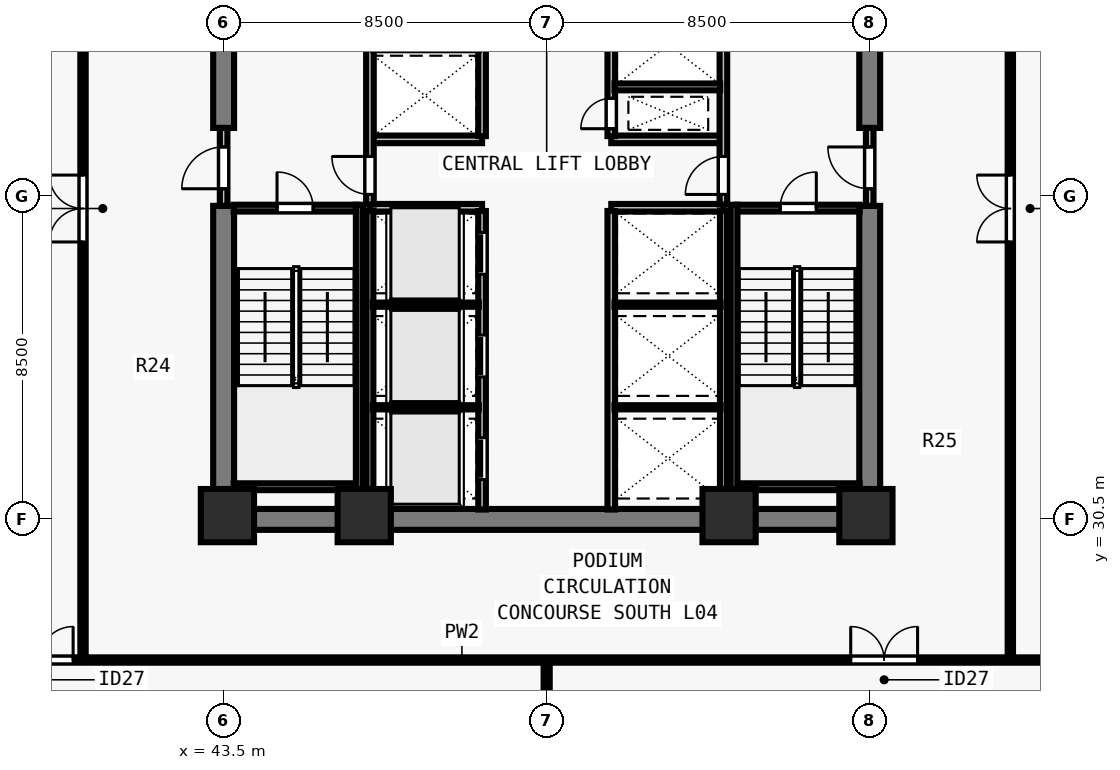
"""IFC4 building model, lengths in metres.
Left out: names, types, materials, properties, quantities, classifications, styles, units other than length and angle.
Written with IfcOpenShell. Run it as: python <this file> out.ifc"""

import sys

from ifc_helpers import new_model, si_unit, direction, frame, frame_2d, origin, origin_2d, place, context, subcontext, project, spatial, rectangle, extrude, element, fill, save


model = new_model("IFC4")
c1 = context("Model", 3, precision=1e-05, world=origin(), true_north=direction((0.0, 1.0)))
c2 = subcontext(c1, "Body", "Model", "MODEL_VIEW")
j1 = project(units=[si_unit("LENGTHUNIT", "METRE"), si_unit("PLANEANGLEUNIT", "RADIAN")], contexts=[c1])
p1 = place(None, origin())
s1 = spatial("IfcSite", under=j1, at=p1, CompositionType="ELEMENT")
p2 = place(p1, origin())
s2 = spatial("IfcBuilding", under=s1, at=p2, CompositionType="ELEMENT")
p3 = place(p2, frame((0.0, 0.0, 19.0)))
s3 = spatial("IfcBuildingStorey", under=s2, at=p3, CompositionType="ELEMENT", Elevation=19.0)
for number, where, z_axis, x_axis in (
    (1, (43.6, 30.6, 0.0), (0.0, 0.0, 1.0), (1.0, 0.0, 0.0)),
    (2, (47.2, 30.6, 0.0), (0.0, 0.0, 1.0), (1.0, 0.0, 0.0)),
    (3, (56.8, 30.6, 0.0), (0.0, 0.0, 1.0), (1.0, 0.0, 0.0)),
    (4, (60.4, 30.6, 0.0), (0.0, 0.0, 1.0), (1.0, 0.0, 0.0)),
):
    element("IfcColumn", number, at=place(p3, frame(where, z_axis=z_axis, x_axis=x_axis)), inside=s3, PredefinedType="COLUMN", context=c2, shape_type="SweptSolid", body=[
        extrude(rectangle(XDim=1.4, YDim=1.4, at=origin_2d()), origin(), (0.0, 0.0, 1.0), 4.5),
    ])
p4 = place(p3, frame((43.225, 30.5, 0.0), z_axis=(0.0, 0.0, 1.0), x_axis=(1.0, 0.0, 0.0)))
e5 = element("IfcWall", 5, at=p4, inside=s3, PredefinedType="SHEAR", context=c2, shape_type="SweptSolid", body=[
    extrude(rectangle(XDim=17.55, YDim=0.55, at=frame_2d((8.775, 0.0))), origin(), (0.0, 0.0, 1.0), 4.28),
])
p5 = place(p3, frame((43.5, 30.765, 0.0), z_axis=(0.0, 0.0, 1.0), x_axis=(0.0, 1.0, 0.0)))
e6 = element("IfcWall", 6, at=p5, inside=s3, PredefinedType="SHEAR", context=c2, shape_type="SweptSolid", body=[
    extrude(rectangle(XDim=7.985, YDim=0.55, at=frame_2d((3.993, 0.0))), origin(), (0.0, 0.0, 1.0), 4.28),
])
p6 = place(p3, frame((43.5, 40.8, 0.0), z_axis=(0.0, 0.0, 1.0), x_axis=(0.0, 1.0, 0.0)))
e7 = element("IfcWall", 7, at=p6, inside=s3, PredefinedType="SHEAR", context=c2, shape_type="SweptSolid", body=[
    extrude(rectangle(XDim=6.435, YDim=0.55, at=frame_2d((3.218, 0.0))), origin(), (0.0, 0.0, 1.0), 4.28),
])
p7 = place(p3, frame((60.5, 30.765, 0.0), z_axis=(0.0, 0.0, 1.0), x_axis=(0.0, 1.0, 0.0)))
e8 = element("IfcWall", 8, at=p7, inside=s3, PredefinedType="SHEAR", context=c2, shape_type="SweptSolid", body=[
    extrude(rectangle(XDim=7.985, YDim=0.55, at=frame_2d((3.993, 0.0))), origin(), (0.0, 0.0, 1.0), 4.28),
])
p8 = place(p3, frame((60.5, 40.8, 0.0), z_axis=(0.0, 0.0, 1.0), x_axis=(0.0, 1.0, 0.0)))
e9 = element("IfcWall", 9, at=p8, inside=s3, PredefinedType="SHEAR", context=c2, shape_type="SweptSolid", body=[
    extrude(rectangle(XDim=6.435, YDim=0.55, at=frame_2d((3.218, 0.0))), origin(), (0.0, 0.0, 1.0), 4.28),
])
for number, where, z_axis, x_axis in (
    (10, (47.35, 38.7, 0.0), (0.0, 0.0, 1.0), (1.0, 0.0, 0.0)),
    (11, (47.35, 40.5, 0.0), (0.0, 0.0, 1.0), (1.0, 0.0, 0.0)),
    (12, (53.7, 38.7, 0.0), (0.0, 0.0, 1.0), (1.0, 0.0, 0.0)),
    (13, (53.7, 40.5, 0.0), (0.0, 0.0, 1.0), (1.0, 0.0, 0.0)),
):
    element("IfcWall", number, at=place(p3, frame(where, z_axis=z_axis, x_axis=x_axis)), inside=s3, PredefinedType="SOLIDWALL", context=c2, shape_type="SweptSolid", body=[
        extrude(rectangle(XDim=2.95, YDim=0.2, at=frame_2d((1.475, 0.0))), origin(), (0.0, 0.0, 1.0), 4.28),
    ])
p9 = place(p3, frame((50.3, 30.76, 0.0), z_axis=(0.0, 0.0, 1.0), x_axis=(0.0, 1.0, 0.0)))
e14 = element("IfcWall", 14, at=p9, inside=s3, PredefinedType="SOLIDWALL", context=c2, shape_type="SweptSolid", body=[
    extrude(rectangle(XDim=7.855, YDim=0.2, at=frame_2d((3.927, 0.0))), origin(), (0.0, 0.0, 1.0), 4.28),
])
p10 = place(p9, frame((0.79, 0.0, 0.0)))
e15 = element("IfcOpeningElement", 15, at=p10, cuts=e14, PredefinedType="OPENING", context=c2, shape_type="SweptSolid", body=[
    extrude(rectangle(XDim=1.1, YDim=2.2, at=frame_2d((0.55, 1.1))), frame((0.0, 0.11, 0.0), z_axis=(0.0, -1.0, 0.0), x_axis=(1.0, 0.0, 0.0)), (0.0, 0.0, 1.0), 0.22),
])
p11 = place(p9, frame((3.49, 0.0, 0.0)))
e16 = element("IfcOpeningElement", 16, at=p11, cuts=e14, PredefinedType="OPENING", context=c2, shape_type="SweptSolid", body=[
    extrude(rectangle(XDim=1.1, YDim=2.2, at=frame_2d((0.55, 1.1))), frame((0.0, 0.11, 0.0), z_axis=(0.0, -1.0, 0.0), x_axis=(1.0, 0.0, 0.0)), (0.0, 0.0, 1.0), 0.22),
])
p12 = place(p9, frame((6.19, 0.0, 0.0)))
e17 = element("IfcOpeningElement", 17, at=p12, cuts=e14, PredefinedType="OPENING", context=c2, shape_type="SweptSolid", body=[
    extrude(rectangle(XDim=1.1, YDim=2.2, at=frame_2d((0.55, 1.1))), frame((0.0, 0.11, 0.0), z_axis=(0.0, -1.0, 0.0), x_axis=(1.0, 0.0, 0.0)), (0.0, 0.0, 1.0), 0.22),
])
p13 = place(p3, frame((53.7, 30.76, 0.0), z_axis=(0.0, 0.0, 1.0), x_axis=(0.0, 1.0, 0.0)))
e18 = element("IfcWall", 18, at=p13, inside=s3, PredefinedType="SOLIDWALL", context=c2, shape_type="SweptSolid", body=[
    extrude(rectangle(XDim=7.855, YDim=0.2, at=frame_2d((3.927, 0.0))), origin(), (0.0, 0.0, 1.0), 4.28),
])
p14 = place(p3, frame((50.3, 40.585, 0.0), z_axis=(0.0, 0.0, 1.0), x_axis=(0.0, 1.0, 0.0)))
e19 = element("IfcWall", 19, at=p14, inside=s3, PredefinedType="SOLIDWALL", context=c2, shape_type="SweptSolid", body=[
    extrude(rectangle(XDim=6.655, YDim=0.2, at=frame_2d((3.328, 0.0))), origin(), (0.0, 0.0, 1.0), 4.28),
])
p15 = place(p14, frame((5.065, 0.0, 0.0)))
e20 = element("IfcOpeningElement", 20, at=p15, cuts=e19, PredefinedType="OPENING", context=c2, shape_type="SweptSolid", body=[
    extrude(rectangle(XDim=0.8, YDim=2.08, at=frame_2d((0.4, 1.04))), frame((0.0, 0.11, 0.0), z_axis=(0.0, -1.0, 0.0), x_axis=(1.0, 0.0, 0.0)), (0.0, 0.0, 1.0), 0.22),
])
p16 = place(p3, frame((53.7, 40.585, 0.0), z_axis=(0.0, 0.0, 1.0), x_axis=(0.0, 1.0, 0.0)))
e21 = element("IfcWall", 21, at=p16, inside=s3, PredefinedType="SOLIDWALL", context=c2, shape_type="SweptSolid", body=[
    extrude(rectangle(XDim=6.655, YDim=0.2, at=frame_2d((3.328, 0.0))), origin(), (0.0, 0.0, 1.0), 4.28),
])
p17 = place(p16, frame((0.195, 0.0, 0.0)))
e22 = element("IfcOpeningElement", 22, at=p17, cuts=e21, PredefinedType="OPENING", context=c2, shape_type="SweptSolid", body=[
    extrude(rectangle(XDim=0.8, YDim=2.08, at=frame_2d((0.4, 1.04))), frame((0.0, 0.11, 0.0), z_axis=(0.0, -1.0, 0.0), x_axis=(1.0, 0.0, 0.0)), (0.0, 0.0, 1.0), 0.22),
])
p18 = place(p16, frame((4.265, 0.0, 0.0)))
e23 = element("IfcOpeningElement", 23, at=p18, cuts=e21, PredefinedType="OPENING", context=c2, shape_type="SweptSolid", body=[
    extrude(rectangle(XDim=0.95, YDim=2.12, at=frame_2d((0.475, 1.06))), frame((0.0, 0.11, 0.0), z_axis=(0.0, -1.0, 0.0), x_axis=(1.0, 0.0, 0.0)), (0.0, 0.0, 1.0), 0.22),
])
p19 = place(p3, frame((43.5, 38.75, 0.0), z_axis=(0.0, 0.0, 1.0), x_axis=(0.0, 1.0, 0.0)))
e24 = element("IfcWall", 24, at=p19, inside=s3, PredefinedType="SOLIDWALL", context=c2, shape_type="SweptSolid", body=[
    extrude(rectangle(XDim=2.05, YDim=0.2, at=frame_2d((1.025, 0.0))), origin(), (0.0, 0.0, 1.0), 4.28),
])
p20 = place(p19, frame((0.45, 0.0, 0.0)))
e25 = element("IfcOpeningElement", 25, at=p20, cuts=e24, PredefinedType="OPENING", context=c2, shape_type="SweptSolid", body=[
    extrude(rectangle(XDim=1.1, YDim=2.15, at=frame_2d((0.55, 1.075))), frame((0.0, 0.11, 0.0), z_axis=(0.0, -1.0, 0.0), x_axis=(1.0, 0.0, 0.0)), (0.0, 0.0, 1.0), 0.22),
])
p21 = place(p3, frame((47.35, 38.785, 0.0), z_axis=(0.0, 0.0, 1.0), x_axis=(0.0, 1.0, 0.0)))
e26 = element("IfcWall", 26, at=p21, inside=s3, PredefinedType="SOLIDWALL", context=c2, shape_type="SweptSolid", body=[
    extrude(rectangle(XDim=4.865, YDim=0.2, at=frame_2d((2.433, 0.0))), origin(), (0.0, 0.0, 1.0), 4.28),
])
p22 = place(p21, frame((0.265, 0.0, 0.0)))
e27 = element("IfcOpeningElement", 27, at=p22, cuts=e26, PredefinedType="OPENING", context=c2, shape_type="SweptSolid", body=[
    extrude(rectangle(XDim=1.0, YDim=2.15, at=frame_2d((0.5, 1.075))), frame((0.0, 0.11, 0.0), z_axis=(0.0, -1.0, 0.0), x_axis=(1.0, 0.0, 0.0)), (0.0, 0.0, 1.0), 0.22),
])
p23 = place(p3, frame((60.5, 38.75, 0.0), z_axis=(0.0, 0.0, 1.0), x_axis=(0.0, 1.0, 0.0)))
e28 = element("IfcWall", 28, at=p23, inside=s3, PredefinedType="SOLIDWALL", context=c2, shape_type="SweptSolid", body=[
    extrude(rectangle(XDim=2.05, YDim=0.2, at=frame_2d((1.025, 0.0))), origin(), (0.0, 0.0, 1.0), 4.28),
])
p24 = place(p23, frame((0.45, 0.0, 0.0)))
e29 = element("IfcOpeningElement", 29, at=p24, cuts=e28, PredefinedType="OPENING", context=c2, shape_type="SweptSolid", body=[
    extrude(rectangle(XDim=1.1, YDim=2.15, at=frame_2d((0.55, 1.075))), frame((0.0, 0.11, 0.0), z_axis=(0.0, -1.0, 0.0), x_axis=(1.0, 0.0, 0.0)), (0.0, 0.0, 1.0), 0.22),
])
p25 = place(p3, frame((56.65, 38.785, 0.0), z_axis=(0.0, 0.0, 1.0), x_axis=(0.0, 1.0, 0.0)))
e30 = element("IfcWall", 30, at=p25, inside=s3, PredefinedType="SOLIDWALL", context=c2, shape_type="SweptSolid", body=[
    extrude(rectangle(XDim=4.865, YDim=0.2, at=frame_2d((2.433, 0.0))), origin(), (0.0, 0.0, 1.0), 4.28),
])
p26 = place(p25, frame((0.265, 0.0, 0.0)))
e31 = element("IfcOpeningElement", 31, at=p26, cuts=e30, PredefinedType="OPENING", context=c2, shape_type="SweptSolid", body=[
    extrude(rectangle(XDim=1.0, YDim=2.15, at=frame_2d((0.5, 1.075))), frame((0.0, 0.11, 0.0), z_axis=(0.0, -1.0, 0.0), x_axis=(1.0, 0.0, 0.0)), (0.0, 0.0, 1.0), 0.22),
])
p27 = place(p3, frame((47.35, 30.76, 0.0), z_axis=(0.0, 0.0, 1.0), x_axis=(0.0, 1.0, 0.0)))
e32 = element("IfcWall", 32, at=p27, inside=s3, PredefinedType="SOLIDWALL", context=c2, shape_type="SweptSolid", body=[
    extrude(rectangle(XDim=7.855, YDim=0.18, at=frame_2d((3.927, 0.0))), origin(), (0.0, 0.0, 1.0), 4.28),
])
for number, where, z_axis, x_axis in (
    (33, (47.425, 33.45, 0.0), (0.0, 0.0, 1.0), (1.0, 0.0, 0.0)),
    (34, (47.425, 36.15, 0.0), (0.0, 0.0, 1.0), (1.0, 0.0, 0.0)),
):
    element("IfcWall", number, at=place(p3, frame(where, z_axis=z_axis, x_axis=x_axis)), inside=s3, PredefinedType="PARTITIONING", context=c2, shape_type="SweptSolid", body=[
        extrude(rectangle(XDim=2.79, YDim=0.11, at=frame_2d((1.395, 0.0))), origin(), (0.0, 0.0, 1.0), 4.28),
    ])
p28 = place(p3, frame((56.65, 30.76, 0.0), z_axis=(0.0, 0.0, 1.0), x_axis=(0.0, 1.0, 0.0)))
e35 = element("IfcWall", 35, at=p28, inside=s3, PredefinedType="SOLIDWALL", context=c2, shape_type="SweptSolid", body=[
    extrude(rectangle(XDim=7.855, YDim=0.18, at=frame_2d((3.927, 0.0))), origin(), (0.0, 0.0, 1.0), 4.28),
])
for number, where, z_axis, x_axis in (
    (36, (53.785, 33.45, 0.0), (0.0, 0.0, 1.0), (1.0, 0.0, 0.0)),
    (37, (53.785, 36.15, 0.0), (0.0, 0.0, 1.0), (1.0, 0.0, 0.0)),
):
    element("IfcWall", number, at=place(p3, frame(where, z_axis=z_axis, x_axis=x_axis)), inside=s3, PredefinedType="PARTITIONING", context=c2, shape_type="SweptSolid", body=[
        extrude(rectangle(XDim=2.79, YDim=0.11, at=frame_2d((1.395, 0.0))), origin(), (0.0, 0.0, 1.0), 4.28),
    ])
p29 = place(p3, frame((53.785, 41.88, 0.0), z_axis=(0.0, 0.0, 1.0), x_axis=(1.0, 0.0, 0.0)))
e38 = element("IfcWall", 38, at=p29, inside=s3, PredefinedType="SOLIDWALL", context=c2, shape_type="SweptSolid", body=[
    extrude(rectangle(XDim=2.78, YDim=0.18, at=frame_2d((1.39, 0.0))), origin(), (0.0, 0.0, 1.0), 4.28),
])
p30 = place(p3, frame((27.45, 26.8, 0.0), z_axis=(0.0, 0.0, 1.0), x_axis=(1.0, 0.0, 0.0)))
e39 = element("IfcWall", 39, at=p30, inside=s3, PredefinedType="PARTITIONING", context=c2, shape_type="SweptSolid", body=[
    extrude(rectangle(XDim=49.1, YDim=0.14, at=frame_2d((24.55, 0.0))), origin(), (0.0, 0.0, 1.0), 3.798),
])
p31 = place(p30, frame((10.33, 0.0, 0.0)))
e40 = element("IfcOpeningElement", 40, at=p31, cuts=e39, PredefinedType="OPENING", context=c2, shape_type="SweptSolid", body=[
    extrude(rectangle(XDim=1.76, YDim=2.2, at=frame_2d((0.88, 1.1))), frame((0.0, 0.08, 0.0), z_axis=(0.0, -1.0, 0.0), x_axis=(1.0, 0.0, 0.0)), (0.0, 0.0, 1.0), 0.16),
])
p32 = place(p30, frame((32.55, 0.0, 0.0)))
e41 = element("IfcOpeningElement", 41, at=p32, cuts=e39, PredefinedType="OPENING", context=c2, shape_type="SweptSolid", body=[
    extrude(rectangle(XDim=1.76, YDim=2.2, at=frame_2d((0.88, 1.1))), frame((0.0, 0.08, 0.0), z_axis=(0.0, -1.0, 0.0), x_axis=(1.0, 0.0, 0.0)), (0.0, 0.0, 1.0), 0.16),
])
p33 = place(p3, frame((39.8, 26.855, 0.0), z_axis=(0.0, 0.0, 1.0), x_axis=(0.0, 1.0, 0.0)))
e42 = element("IfcWall", 42, at=p33, inside=s3, PredefinedType="PARTITIONING", context=c2, shape_type="SweptSolid", body=[
    extrude(rectangle(XDim=24.29, YDim=0.14, at=frame_2d((12.145, 0.0))), origin(), (0.0, 0.0, 1.0), 4.28),
])
p34 = place(p33, frame((10.945, 0.0, 0.0)))
e43 = element("IfcOpeningElement", 43, at=p34, cuts=e42, PredefinedType="OPENING", context=c2, shape_type="SweptSolid", body=[
    extrude(rectangle(XDim=1.76, YDim=2.2, at=frame_2d((0.88, 1.1))), frame((0.0, 0.08, 0.0), z_axis=(0.0, -1.0, 0.0), x_axis=(1.0, 0.0, 0.0)), (0.0, 0.0, 1.0), 0.16),
])
p35 = place(p3, frame((64.2, 26.855, 0.0), z_axis=(0.0, 0.0, 1.0), x_axis=(0.0, 1.0, 0.0)))
e44 = element("IfcWall", 44, at=p35, inside=s3, PredefinedType="PARTITIONING", context=c2, shape_type="SweptSolid", body=[
    extrude(rectangle(XDim=24.29, YDim=0.14, at=frame_2d((12.145, 0.0))), origin(), (0.0, 0.0, 1.0), 4.28),
])
p36 = place(p35, frame((10.945, 0.0, 0.0)))
e45 = element("IfcOpeningElement", 45, at=p36, cuts=e44, PredefinedType="OPENING", context=c2, shape_type="SweptSolid", body=[
    extrude(rectangle(XDim=1.76, YDim=2.2, at=frame_2d((0.88, 1.1))), frame((0.0, 0.08, 0.0), z_axis=(0.0, -1.0, 0.0), x_axis=(1.0, 0.0, 0.0)), (0.0, 0.0, 1.0), 0.16),
])
p37 = place(p3, frame((52.0, 14.55, 0.0), z_axis=(0.0, 0.0, 1.0), x_axis=(0.0, 1.0, 0.0)))
e46 = element("IfcWall", 46, at=p37, inside=s3, PredefinedType="PARTITIONING", context=c2, shape_type="SweptSolid", body=[
    extrude(rectangle(XDim=12.15, YDim=0.16, at=frame_2d((6.075, 0.0))), origin(), (0.0, 0.0, 1.0), 4.28),
])
p38 = place(p3, frame((43.765, 38.69, 0.0), z_axis=(0.0, 0.0, 1.0), x_axis=(1.0, 0.0, 0.0)))
e47 = element("IfcWall", 47, at=p38, inside=s3, PredefinedType="SOLIDWALL", context=c2, shape_type="SweptSolid", body=[
    extrude(rectangle(XDim=3.23, YDim=0.18, at=frame_2d((1.615, 0.0))), origin(), (0.0, 0.0, 1.0), 4.28),
])
p39 = place(p38, frame((1.14, 0.0, 0.0)))
e48 = element("IfcOpeningElement", 48, at=p39, cuts=e47, PredefinedType="OPENING", context=c2, shape_type="SweptSolid", body=[
    extrude(rectangle(XDim=0.95, YDim=2.15, at=frame_2d((0.475, 1.075))), frame((0.0, 0.1, 0.0), z_axis=(0.0, -1.0, 0.0), x_axis=(1.0, 0.0, 0.0)), (0.0, 0.0, 1.0), 0.2),
])
p40 = place(p3, frame((43.765, 31.36, 0.0), z_axis=(0.0, 0.0, 1.0), x_axis=(1.0, 0.0, 0.0)))
e49 = element("IfcWall", 49, at=p40, inside=s3, PredefinedType="SOLIDWALL", context=c2, shape_type="SweptSolid", body=[
    extrude(rectangle(XDim=3.23, YDim=0.18, at=frame_2d((1.615, 0.0))), origin(), (0.0, 0.0, 1.0), 4.28),
])
p41 = place(p3, frame((47.07, 38.78, 0.0), z_axis=(0.0, 0.0, 1.0), x_axis=(0.0, -1.0, 0.0)))
e50 = element("IfcWall", 50, at=p41, inside=s3, PredefinedType="SOLIDWALL", context=c2, shape_type="SweptSolid", body=[
    extrude(rectangle(XDim=8.017, YDim=0.18, at=frame_2d((4.009, 0.0))), origin(), (0.0, 0.0, 1.0), 4.28),
])
p42 = place(p3, frame((57.005, 38.69, 0.0), z_axis=(0.0, 0.0, 1.0), x_axis=(1.0, 0.0, 0.0)))
e51 = element("IfcWall", 51, at=p42, inside=s3, PredefinedType="SOLIDWALL", context=c2, shape_type="SweptSolid", body=[
    extrude(rectangle(XDim=3.23, YDim=0.18, at=frame_2d((1.615, 0.0))), origin(), (0.0, 0.0, 1.0), 4.28),
])
p43 = place(p42, frame((1.14, 0.0, 0.0)))
e52 = element("IfcOpeningElement", 52, at=p43, cuts=e51, PredefinedType="OPENING", context=c2, shape_type="SweptSolid", body=[
    extrude(rectangle(XDim=0.95, YDim=2.15, at=frame_2d((0.475, 1.075))), frame((0.0, 0.1, 0.0), z_axis=(0.0, -1.0, 0.0), x_axis=(1.0, 0.0, 0.0)), (0.0, 0.0, 1.0), 0.2),
])
p44 = place(p3, frame((57.005, 31.36, 0.0), z_axis=(0.0, 0.0, 1.0), x_axis=(1.0, 0.0, 0.0)))
e53 = element("IfcWall", 53, at=p44, inside=s3, PredefinedType="SOLIDWALL", context=c2, shape_type="SweptSolid", body=[
    extrude(rectangle(XDim=3.23, YDim=0.18, at=frame_2d((1.615, 0.0))), origin(), (0.0, 0.0, 1.0), 4.28),
])
p45 = place(p3, frame((56.93, 38.78, 0.0), z_axis=(0.0, 0.0, 1.0), x_axis=(0.0, -1.0, 0.0)))
e54 = element("IfcWall", 54, at=p45, inside=s3, PredefinedType="SOLIDWALL", context=c2, shape_type="SweptSolid", body=[
    extrude(rectangle(XDim=8.017, YDim=0.18, at=frame_2d((4.009, 0.0))), origin(), (0.0, 0.0, 1.0), 4.28),
])
p46 = place(p20, origin())
e55 = element("IfcDoor", 55, at=p46, inside=s3, OperationType="SINGLE_SWING_LEFT", PredefinedType="DOOR", context=c2, shape_type="SweptSolid", body=[
    extrude(rectangle(XDim=1.1, YDim=2.15, at=frame_2d((0.55, 1.075))), frame((0.0, 0.025, 0.0), z_axis=(0.0, -1.0, 0.0), x_axis=(1.0, 0.0, 0.0)), (0.0, 0.0, 1.0), 0.05),
])
fill(e25, e55)
p47 = place(p22, origin())
e56 = element("IfcDoor", 56, at=p47, inside=s3, OperationType="SINGLE_SWING_RIGHT", PredefinedType="DOOR", context=c2, shape_type="SweptSolid", body=[
    extrude(rectangle(XDim=1.0, YDim=2.15, at=frame_2d((0.5, 1.075))), frame((0.0, 0.025, 0.0), z_axis=(0.0, -1.0, 0.0), x_axis=(1.0, 0.0, 0.0)), (0.0, 0.0, 1.0), 0.05),
])
fill(e27, e56)
p48 = place(p24, origin())
e57 = element("IfcDoor", 57, at=p48, inside=s3, OperationType="SINGLE_SWING_RIGHT", PredefinedType="DOOR", context=c2, shape_type="SweptSolid", body=[
    extrude(rectangle(XDim=1.1, YDim=2.15, at=frame_2d((0.55, 1.075))), frame((0.0, 0.025, 0.0), z_axis=(0.0, -1.0, 0.0), x_axis=(1.0, 0.0, 0.0)), (0.0, 0.0, 1.0), 0.05),
])
fill(e29, e57)
p49 = place(p26, origin())
e58 = element("IfcDoor", 58, at=p49, inside=s3, OperationType="SINGLE_SWING_LEFT", PredefinedType="DOOR", context=c2, shape_type="SweptSolid", body=[
    extrude(rectangle(XDim=1.0, YDim=2.15, at=frame_2d((0.5, 1.075))), frame((0.0, 0.025, 0.0), z_axis=(0.0, -1.0, 0.0), x_axis=(1.0, 0.0, 0.0)), (0.0, 0.0, 1.0), 0.05),
])
fill(e31, e58)
p50 = place(p10, origin())
e59 = element("IfcDoor", 59, at=p50, inside=s3, OperationType="SLIDING_TO_LEFT", PredefinedType="DOOR", context=c2, shape_type="SweptSolid", body=[
    extrude(rectangle(XDim=1.1, YDim=2.2, at=frame_2d((0.55, 1.1))), frame((0.0, 0.025, 0.0), z_axis=(0.0, -1.0, 0.0), x_axis=(1.0, 0.0, 0.0)), (0.0, 0.0, 1.0), 0.05),
])
fill(e15, e59)
p51 = place(p11, origin())
e60 = element("IfcDoor", 60, at=p51, inside=s3, OperationType="SLIDING_TO_LEFT", PredefinedType="DOOR", context=c2, shape_type="SweptSolid", body=[
    extrude(rectangle(XDim=1.1, YDim=2.2, at=frame_2d((0.55, 1.1))), frame((0.0, 0.025, 0.0), z_axis=(0.0, -1.0, 0.0), x_axis=(1.0, 0.0, 0.0)), (0.0, 0.0, 1.0), 0.05),
])
fill(e16, e60)
p52 = place(p12, origin())
e61 = element("IfcDoor", 61, at=p52, inside=s3, OperationType="SLIDING_TO_LEFT", PredefinedType="DOOR", context=c2, shape_type="SweptSolid", body=[
    extrude(rectangle(XDim=1.1, YDim=2.2, at=frame_2d((0.55, 1.1))), frame((0.0, 0.025, 0.0), z_axis=(0.0, -1.0, 0.0), x_axis=(1.0, 0.0, 0.0)), (0.0, 0.0, 1.0), 0.05),
])
fill(e17, e61)
p53 = place(p17, origin())
e62 = element("IfcDoor", 62, at=p53, inside=s3, OperationType="SINGLE_SWING_LEFT", PredefinedType="DOOR", context=c2, shape_type="SweptSolid", body=[
    extrude(rectangle(XDim=0.8, YDim=2.08, at=frame_2d((0.4, 1.04))), frame((0.0, 0.025, 0.0), z_axis=(0.0, -1.0, 0.0), x_axis=(1.0, 0.0, 0.0)), (0.0, 0.0, 1.0), 0.05),
])
fill(e22, e62)
p54 = place(p31, origin())
e63 = element("IfcDoor", 63, at=p54, inside=s3, OperationType="DOUBLE_DOOR_SINGLE_SWING", PredefinedType="DOOR", context=c2, shape_type="SweptSolid", body=[
    extrude(rectangle(XDim=1.76, YDim=2.2, at=frame_2d((0.88, 1.1))), frame((0.0, 0.025, 0.0), z_axis=(0.0, -1.0, 0.0), x_axis=(1.0, 0.0, 0.0)), (0.0, 0.0, 1.0), 0.05),
])
fill(e40, e63)
p55 = place(p32, origin())
e64 = element("IfcDoor", 64, at=p55, inside=s3, OperationType="DOUBLE_DOOR_SINGLE_SWING", PredefinedType="DOOR", context=c2, shape_type="SweptSolid", body=[
    extrude(rectangle(XDim=1.76, YDim=2.2, at=frame_2d((0.88, 1.1))), frame((0.0, 0.025, 0.0), z_axis=(0.0, -1.0, 0.0), x_axis=(1.0, 0.0, 0.0)), (0.0, 0.0, 1.0), 0.05),
])
fill(e41, e64)
p56 = place(p34, origin())
e65 = element("IfcDoor", 65, at=p56, inside=s3, OperationType="DOUBLE_DOOR_SINGLE_SWING", PredefinedType="DOOR", context=c2, shape_type="SweptSolid", body=[
    extrude(rectangle(XDim=1.76, YDim=2.2, at=frame_2d((0.88, 1.1))), frame((0.0, 0.025, 0.0), z_axis=(0.0, -1.0, 0.0), x_axis=(1.0, 0.0, 0.0)), (0.0, 0.0, 1.0), 0.05),
])
fill(e43, e65)
p57 = place(p36, origin())
e66 = element("IfcDoor", 66, at=p57, inside=s3, OperationType="DOUBLE_DOOR_SINGLE_SWING", PredefinedType="DOOR", context=c2, shape_type="SweptSolid", body=[
    extrude(rectangle(XDim=1.76, YDim=2.2, at=frame_2d((0.88, 1.1))), frame((0.0, 0.025, 0.0), z_axis=(0.0, -1.0, 0.0), x_axis=(1.0, 0.0, 0.0)), (0.0, 0.0, 1.0), 0.05),
])
fill(e45, e66)
p58 = place(p39, origin())
e67 = element("IfcDoor", 67, at=p58, inside=s3, OperationType="SINGLE_SWING_LEFT", PredefinedType="DOOR", context=c2, shape_type="SweptSolid", body=[
    extrude(rectangle(XDim=0.95, YDim=2.15, at=frame_2d((0.475, 1.075))), frame((0.0, 0.025, 0.0), z_axis=(0.0, -1.0, 0.0), x_axis=(1.0, 0.0, 0.0)), (0.0, 0.0, 1.0), 0.05),
])
fill(e48, e67)
p59 = place(p43, origin())
e68 = element("IfcDoor", 68, at=p59, inside=s3, OperationType="SINGLE_SWING_RIGHT", PredefinedType="DOOR", context=c2, shape_type="SweptSolid", body=[
    extrude(rectangle(XDim=0.95, YDim=2.15, at=frame_2d((0.475, 1.075))), frame((0.0, 0.025, 0.0), z_axis=(0.0, -1.0, 0.0), x_axis=(1.0, 0.0, 0.0)), (0.0, 0.0, 1.0), 0.05),
])
fill(e52, e68)
save(model, sys.argv[1])
